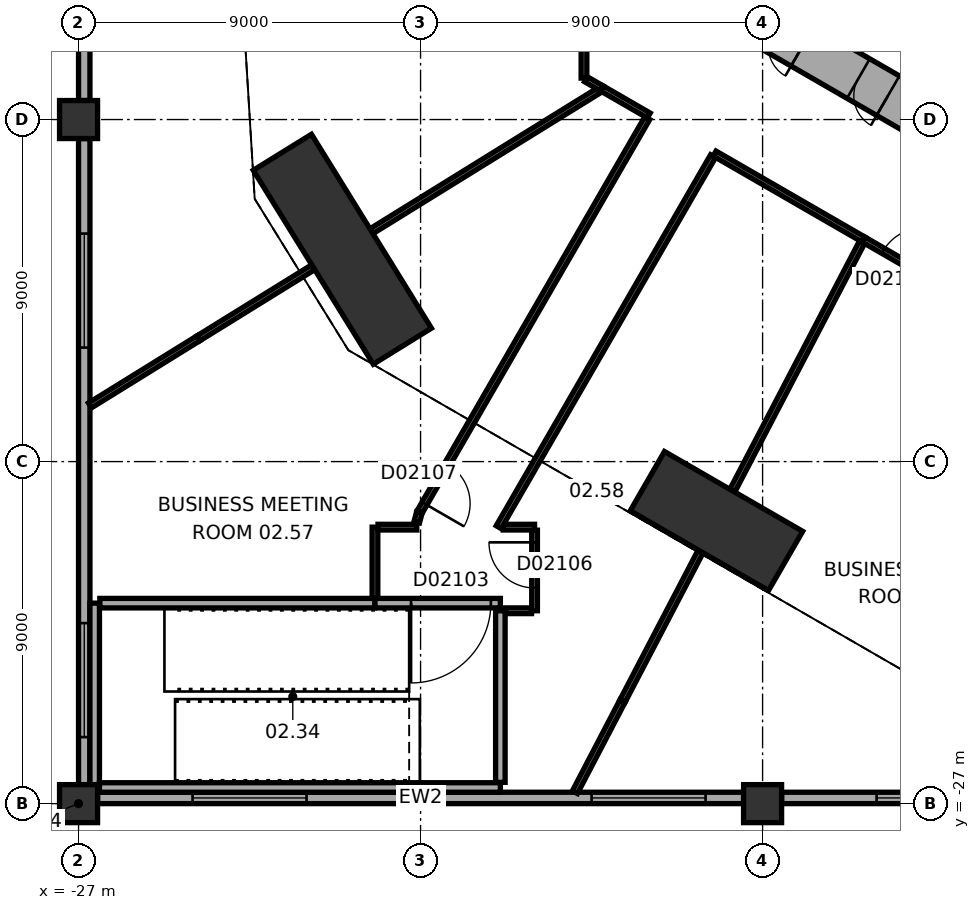
"""IFC4 building model, lengths in metres.
Left out: names, types, materials, properties, quantities, classifications, styles, units other than length and angle.
Written with IfcOpenShell. Run it as: python <this file> out.ifc"""

import sys

from ifc_helpers import new_model, si_unit, direction, frame, frame_2d, origin, origin_2d, place, context, subcontext, project, spatial, rectangle, extrude, element, fill, save


model = new_model("IFC4")
c1 = context("Model", 3, precision=1e-05, world=origin(), true_north=direction((0.0, 1.0)))
c2 = subcontext(c1, "Body", "Model", "MODEL_VIEW")
j1 = project(units=[si_unit("LENGTHUNIT", "METRE"), si_unit("PLANEANGLEUNIT", "RADIAN")], contexts=[c1])
p1 = place(None, origin())
s1 = spatial("IfcSite", under=j1, at=p1, CompositionType="ELEMENT")
p2 = place(p1, origin())
s2 = spatial("IfcBuilding", under=s1, at=p2, CompositionType="ELEMENT")
p3 = place(p2, frame((0.0, 0.0, 13.0)))
s3 = spatial("IfcBuildingStorey", under=s2, at=p3, CompositionType="ELEMENT", Elevation=13.0)
p4 = place(p3, frame((-20.058, -12.413, 0.0), z_axis=(0.0, 0.0, 1.0), x_axis=(0.526202050444, -0.850359572245, 0.0)))
e1 = element("IfcColumn", 1, at=p4, inside=s3, PredefinedType="COLUMN", context=c2, shape_type="SweptSolid", body=[
    extrude(rectangle(XDim=6.0, YDim=1.8, at=origin_2d()), origin(), (0.0, 0.0, 1.0), 8.0),
])
p5 = place(p3, frame((-10.213, -19.564, 0.0), z_axis=(0.0, 0.0, 1.0), x_axis=(0.866028021766, -0.499995465495, 0.0)))
e2 = element("IfcColumn", 2, at=p5, inside=s3, PredefinedType="COLUMN", context=c2, shape_type="SweptSolid", body=[
    extrude(rectangle(XDim=4.2, YDim=1.8, at=origin_2d()), origin(), (0.0, 0.0, 1.0), 8.0),
])
for number, where, z_axis, x_axis in (
    (3, (-27.0, -27.0, 0.0), (0.0, 0.0, 1.0), (1.0, 0.0, 0.0)),
    (4, (-27.0, -9.0, 0.0), (0.0, 0.0, 1.0), (1.0, 0.0, 0.0)),
    (5, (-9.0, -27.0, 0.0), (0.0, 0.0, 1.0), (1.0, 0.0, 0.0)),
):
    element("IfcColumn", number, at=place(p3, frame(where, z_axis=z_axis, x_axis=x_axis)), inside=s3, PredefinedType="COLUMN", context=c2, shape_type="SweptSolid", body=[
        extrude(rectangle(XDim=1.0, YDim=1.0, at=origin_2d()), origin(), (0.0, 0.0, 1.0), 8.0),
    ])
p6 = place(p3, frame((-10.4, -5.658, 0.0), z_axis=(0.0, 0.0, 1.0), x_axis=(0.866021384402, -0.500006961711, 0.0)))
e6 = element("IfcWall", 6, at=p6, inside=s3, PredefinedType="SHEAR", context=c2, shape_type="SweptSolid", body=[
    extrude(rectangle(XDim=12.355, YDim=1.2, at=frame_2d((6.178, 0.0))), origin(), (0.0, 0.0, 1.0), 8.0),
])
p7 = place(p6, frame((6.378, 0.0, 0.0)))
e7 = element("IfcOpeningElement", 7, at=p7, cuts=e6, PredefinedType="OPENING", context=c2, shape_type="SweptSolid", body=[
    extrude(rectangle(XDim=1.5, YDim=2.1, at=frame_2d((0.75, 1.05))), frame((0.0, 0.61, 0.0), z_axis=(0.0, -1.0, 0.0), x_axis=(1.0, 0.0, 0.0)), (0.0, 0.0, 1.0), 1.22),
])
p8 = place(p6, frame((1.928, 0.0, 0.0)))
e8 = element("IfcOpeningElement", 8, at=p8, cuts=e6, PredefinedType="OPENING", context=c2, shape_type="SweptSolid", body=[
    extrude(rectangle(XDim=0.9, YDim=2.1, at=frame_2d((0.45, 1.05))), frame((0.0, 0.61, 0.0), z_axis=(0.0, -1.0, 0.0), x_axis=(1.0, 0.0, 0.0)), (0.0, 0.0, 1.0), 1.22),
])
p9 = place(p6, frame((4.528, 0.0, 0.0)))
e9 = element("IfcOpeningElement", 9, at=p9, cuts=e6, PredefinedType="OPENING", context=c2, shape_type="SweptSolid", body=[
    extrude(rectangle(XDim=0.9, YDim=2.1, at=frame_2d((0.45, 1.05))), frame((0.0, 0.61, 0.0), z_axis=(0.0, -1.0, 0.0), x_axis=(1.0, 0.0, 0.0)), (0.0, 0.0, 1.0), 1.22),
])
p10 = place(p3, frame((-26.5, -26.85, 0.0), z_axis=(0.0, 0.0, 1.0), x_axis=(1.0, 0.0, 0.0)))
e10 = element("IfcWall", 10, at=p10, inside=s3, PredefinedType="STANDARD", context=c2, shape_type="SweptSolid", body=[
    extrude(rectangle(XDim=17.0, YDim=0.3, at=frame_2d((8.5, 0.0))), origin(), (0.0, 0.0, 1.0), 6.5),
])
p11 = place(p10, frame((2.5, 0.0, 1.0)))
e11 = element("IfcOpeningElement", 11, at=p11, cuts=e10, PredefinedType="OPENING", context=c2, shape_type="SweptSolid", body=[
    extrude(rectangle(XDim=3.0, YDim=4.0, at=frame_2d((1.5, 2.0))), frame((0.0, 0.16, 0.0), z_axis=(0.0, -1.0, 0.0), x_axis=(1.0, 0.0, 0.0)), (0.0, 0.0, 1.0), 0.32),
])
p12 = place(p10, frame((13.0, 0.0, 1.0)))
e12 = element("IfcOpeningElement", 12, at=p12, cuts=e10, PredefinedType="OPENING", context=c2, shape_type="SweptSolid", body=[
    extrude(rectangle(XDim=3.0, YDim=4.0, at=frame_2d((1.5, 2.0))), frame((0.0, 0.16, 0.0), z_axis=(0.0, -1.0, 0.0), x_axis=(1.0, 0.0, 0.0)), (0.0, 0.0, 1.0), 0.32),
])
p13 = place(p3, frame((-8.5, -26.85, 0.0), z_axis=(0.0, 0.0, 1.0), x_axis=(1.0, 0.0, 0.0)))
e13 = element("IfcWall", 13, at=p13, inside=s3, PredefinedType="STANDARD", context=c2, shape_type="SweptSolid", body=[
    extrude(rectangle(XDim=17.0, YDim=0.3, at=frame_2d((8.5, 0.0))), origin(), (0.0, 0.0, 1.0), 6.5),
])
p14 = place(p13, frame((2.5, 0.0, 1.0)))
e14 = element("IfcOpeningElement", 14, at=p14, cuts=e13, PredefinedType="OPENING", context=c2, shape_type="SweptSolid", body=[
    extrude(rectangle(XDim=3.0, YDim=4.0, at=frame_2d((1.5, 2.0))), frame((0.0, 0.16, 0.0), z_axis=(0.0, -1.0, 0.0), x_axis=(1.0, 0.0, 0.0)), (0.0, 0.0, 1.0), 0.32),
])
p15 = place(p13, frame((11.5, 0.0, 1.0)))
e15 = element("IfcOpeningElement", 15, at=p15, cuts=e13, PredefinedType="OPENING", context=c2, shape_type="SweptSolid", body=[
    extrude(rectangle(XDim=3.0, YDim=4.0, at=frame_2d((1.5, 2.0))), frame((0.0, 0.16, 0.0), z_axis=(0.0, -1.0, 0.0), x_axis=(1.0, 0.0, 0.0)), (0.0, 0.0, 1.0), 0.32),
])
p16 = place(p3, frame((-26.85, 8.5, 0.0), z_axis=(0.0, 0.0, 1.0), x_axis=(0.0, -1.0, 0.0)))
e16 = element("IfcWall", 16, at=p16, inside=s3, PredefinedType="STANDARD", context=c2, shape_type="SweptSolid", body=[
    extrude(rectangle(XDim=17.0, YDim=0.3, at=frame_2d((8.5, 0.0))), origin(), (0.0, 0.0, 1.0), 6.5),
])
p17 = place(p16, frame((2.5, 0.0, 1.0)))
e17 = element("IfcOpeningElement", 17, at=p17, cuts=e16, PredefinedType="OPENING", context=c2, shape_type="SweptSolid", body=[
    extrude(rectangle(XDim=3.0, YDim=4.0, at=frame_2d((1.5, 2.0))), frame((0.0, 0.16, 0.0), z_axis=(0.0, -1.0, 0.0), x_axis=(1.0, 0.0, 0.0)), (0.0, 0.0, 1.0), 0.32),
])
p18 = place(p16, frame((11.5, 0.0, 1.0)))
e18 = element("IfcOpeningElement", 18, at=p18, cuts=e16, PredefinedType="OPENING", context=c2, shape_type="SweptSolid", body=[
    extrude(rectangle(XDim=3.0, YDim=4.0, at=frame_2d((1.5, 2.0))), frame((0.0, 0.16, 0.0), z_axis=(0.0, -1.0, 0.0), x_axis=(1.0, 0.0, 0.0)), (0.0, 0.0, 1.0), 0.32),
])
p19 = place(p3, frame((-26.85, -9.5, 0.0), z_axis=(0.0, 0.0, 1.0), x_axis=(0.0, -1.0, 0.0)))
e19 = element("IfcWall", 19, at=p19, inside=s3, PredefinedType="STANDARD", context=c2, shape_type="SweptSolid", body=[
    extrude(rectangle(XDim=17.0, YDim=0.3, at=frame_2d((8.5, 0.0))), origin(), (0.0, 0.0, 1.0), 6.5),
])
p20 = place(p19, frame((2.5, 0.0, 1.0)))
e20 = element("IfcOpeningElement", 20, at=p20, cuts=e19, PredefinedType="OPENING", context=c2, shape_type="SweptSolid", body=[
    extrude(rectangle(XDim=3.0, YDim=4.0, at=frame_2d((1.5, 2.0))), frame((0.0, 0.16, 0.0), z_axis=(0.0, -1.0, 0.0), x_axis=(1.0, 0.0, 0.0)), (0.0, 0.0, 1.0), 0.32),
])
p21 = place(p19, frame((12.75, 0.0, 1.0)))
e21 = element("IfcOpeningElement", 21, at=p21, cuts=e19, PredefinedType="OPENING", context=c2, shape_type="SweptSolid", body=[
    extrude(rectangle(XDim=3.0, YDim=4.0, at=frame_2d((1.5, 2.0))), frame((0.0, 0.16, 0.0), z_axis=(0.0, -1.0, 0.0), x_axis=(1.0, 0.0, 0.0)), (0.0, 0.0, 1.0), 0.32),
])
p22 = place(p3, frame((-12.686, -24.3, 0.0), z_axis=(0.0, 0.0, 1.0), x_axis=(-0.462800215564, -0.886462610872, 0.0)))
e22 = element("IfcWall", 22, at=p22, inside=s3, PredefinedType="PARTITIONING", context=c2, shape_type="SweptSolid", body=[
    extrude(rectangle(XDim=2.707, YDim=0.15, at=frame_2d((1.354, 0.0))), origin(), (0.0, 0.0, 1.0), 7.7),
])
p23 = place(p3, frame((-12.686, -24.3, 0.0), z_axis=(0.0, 0.0, 1.0), x_axis=(0.462800821993, 0.88646229427, 0.0)))
e23 = element("IfcWall", 23, at=p23, inside=s3, PredefinedType="PARTITIONING", context=c2, shape_type="SweptSolid", body=[
    extrude(rectangle(XDim=4.441, YDim=0.15, at=frame_2d((2.221, 0.0))), origin(), (0.0, 0.0, 1.0), 7.7),
])
p24 = place(p3, frame((-15.9, -21.925, 0.0), z_axis=(0.0, 0.0, 1.0), x_axis=(0.0, -1.0, 0.0)))
e24 = element("IfcWall", 24, at=p24, inside=s3, PredefinedType="SOLIDWALL", context=c2, shape_type="SweptSolid", body=[
    extrude(rectangle(XDim=4.515, YDim=0.25, at=frame_2d((2.257, 0.0))), origin(), (0.0, 0.0, 1.0), 7.7),
])
p25 = place(p3, frame((-15.08, -21.925, 0.0), z_axis=(0.0, 0.0, 1.0), x_axis=(-1.0, 0.0, 0.0)))
e25 = element("IfcWall", 25, at=p25, inside=s3, PredefinedType="PARTITIONING", context=c2, shape_type="SweptSolid", body=[
    extrude(rectangle(XDim=0.68, YDim=0.15, at=frame_2d((0.34, 0.0))), origin(), (0.0, 0.0, 1.0), 7.7),
])
p26 = place(p3, frame((-26.44, -21.725, 0.0), z_axis=(0.0, 0.0, 1.0), x_axis=(1.0, 0.0, 0.0)))
e26 = element("IfcWall", 26, at=p26, inside=s3, PredefinedType="SOLIDWALL", context=c2, shape_type="SweptSolid", body=[
    extrude(rectangle(XDim=7.24, YDim=0.25, at=frame_2d((3.62, 0.0))), origin(), (0.0, 0.0, 1.0), 7.7),
])
p27 = place(p3, frame((-19.2, -21.725, 0.0), z_axis=(0.0, 0.0, 1.0), x_axis=(1.0, 0.0, 0.0)))
e27 = element("IfcWall", 27, at=p27, inside=s3, PredefinedType="SOLIDWALL", context=c2, shape_type="SweptSolid", body=[
    extrude(rectangle(XDim=3.3, YDim=0.25, at=frame_2d((1.65, 0.0))), origin(), (0.0, 0.0, 1.0), 7.7),
])
p28 = place(p27, frame((0.95, 0.0, 0.0)))
e28 = element("IfcOpeningElement", 28, at=p28, cuts=e27, PredefinedType="OPENING", context=c2, shape_type="SweptSolid", body=[
    extrude(rectangle(XDim=2.1, YDim=2.4, at=frame_2d((1.05, 1.2))), frame((0.0, 0.135, 0.0), z_axis=(0.0, -1.0, 0.0), x_axis=(1.0, 0.0, 0.0)), (0.0, 0.0, 1.0), 0.27),
])
p29 = place(p3, frame((-19.2, -21.585, 0.0), z_axis=(0.0, 0.0, 1.0), x_axis=(0.0, 1.0, 0.0)))
e29 = element("IfcWall", 29, at=p29, inside=s3, PredefinedType="PARTITIONING", context=c2, shape_type="SweptSolid", body=[
    extrude(rectangle(XDim=1.86, YDim=0.15, at=frame_2d((0.93, 0.0))), origin(), (0.0, 0.0, 1.0), 7.7),
])
p30 = place(p3, frame((-15.0, -19.805, 0.0), z_axis=(0.0, 0.0, 1.0), x_axis=(0.0, -1.0, 0.0)))
e30 = element("IfcWall", 30, at=p30, inside=s3, PredefinedType="PARTITIONING", context=c2, shape_type="SweptSolid", body=[
    extrude(rectangle(XDim=2.12, YDim=0.15, at=frame_2d((1.06, 0.0))), origin(), (0.0, 0.0, 1.0), 7.7),
])
p31 = place(p30, frame((0.32, 0.0, 0.0)))
e31 = element("IfcOpeningElement", 31, at=p31, cuts=e30, PredefinedType="OPENING", context=c2, shape_type="SweptSolid", body=[
    extrude(rectangle(XDim=1.2, YDim=2.1, at=frame_2d((0.6, 1.05))), frame((0.0, 0.085, 0.0), z_axis=(0.0, -1.0, 0.0), x_axis=(1.0, 0.0, 0.0)), (0.0, 0.0, 1.0), 0.17),
])
p32 = place(p3, frame((-19.12, -19.725, 0.0), z_axis=(0.0, 0.0, 1.0), x_axis=(1.0, 0.0, 0.0)))
e32 = element("IfcWall", 32, at=p32, inside=s3, PredefinedType="PARTITIONING", context=c2, shape_type="SweptSolid", body=[
    extrude(rectangle(XDim=1.02, YDim=0.15, at=frame_2d((0.51, 0.0))), origin(), (0.0, 0.0, 1.0), 7.7),
])
p33 = place(p3, frame((-15.825, -19.725, 0.0), z_axis=(0.0, 0.0, 1.0), x_axis=(1.0, 0.0, 0.0)))
e33 = element("IfcWall", 33, at=p33, inside=s3, PredefinedType="PARTITIONING", context=c2, shape_type="SweptSolid", body=[
    extrude(rectangle(XDim=0.825, YDim=0.15, at=frame_2d((0.413, 0.0))), origin(), (0.0, 0.0, 1.0), 7.7),
])
p34 = place(p3, frame((-18.1, -19.593, 0.0), z_axis=(0.0, 0.0, 1.0), x_axis=(0.260139468531, 0.965571052234, 0.0)))
e34 = element("IfcWall", 34, at=p34, inside=s3, PredefinedType="PARTITIONING", context=c2, shape_type="SweptSolid", body=[
    extrude(rectangle(XDim=0.264, YDim=0.15, at=frame_2d((0.132, 0.0))), origin(), (0.0, 0.0, 1.0), 7.7),
])
p35 = place(p3, frame((-18.021, -19.321, 0.0), z_axis=(0.0, 0.0, 1.0), x_axis=(0.500403049961, 0.865792577694, 0.0)))
e35 = element("IfcWall", 35, at=p35, inside=s3, PredefinedType="PARTITIONING", context=c2, shape_type="SweptSolid", body=[
    extrude(rectangle(XDim=11.963, YDim=0.15, at=frame_2d((5.982, 0.0))), origin(), (0.0, 0.0, 1.0), 7.7),
])
p36 = place(p35, frame((0.25, 0.0, 0.0)))
e36 = element("IfcOpeningElement", 36, at=p36, cuts=e35, PredefinedType="OPENING", context=c2, shape_type="SweptSolid", body=[
    extrude(rectangle(XDim=1.2, YDim=2.1, at=frame_2d((0.6, 1.05))), frame((0.0, 0.085, 0.0), z_axis=(0.0, -1.0, 0.0), x_axis=(1.0, 0.0, 0.0)), (0.0, 0.0, 1.0), 0.17),
])
p37 = place(p3, frame((-9.796, -18.766, 0.0), z_axis=(0.0, 0.0, 1.0), x_axis=(0.462793341808, 0.886466199456, 0.0)))
e37 = element("IfcWall", 37, at=p37, inside=s3, PredefinedType="PARTITIONING", context=c2, shape_type="SweptSolid", body=[
    extrude(rectangle(XDim=7.376, YDim=0.15, at=frame_2d((3.688, 0.0))), origin(), (0.0, 0.0, 1.0), 7.7),
])
p38 = place(p3, frame((0.0, -15.82, 0.0), z_axis=(0.0, 0.0, 1.0), x_axis=(-0.866018019704, 0.500012789385, 0.0)))
e38 = element("IfcWall", 38, at=p38, inside=s3, PredefinedType="PARTITIONING", context=c2, shape_type="SweptSolid", body=[
    extrude(rectangle(XDim=7.327, YDim=0.15, at=frame_2d((3.664, 0.0))), origin(), (0.0, 0.0, 1.0), 7.7),
])
p39 = place(p38, frame((5.527, 0.0, 0.0)))
e39 = element("IfcOpeningElement", 39, at=p39, cuts=e38, PredefinedType="OPENING", context=c2, shape_type="SweptSolid", body=[
    extrude(rectangle(XDim=1.2, YDim=2.1, at=frame_2d((0.6, 1.05))), frame((0.0, 0.085, 0.0), z_axis=(0.0, -1.0, 0.0), x_axis=(1.0, 0.0, 0.0)), (0.0, 0.0, 1.0), 0.17),
])
p40 = place(p3, frame((-23.843, -14.754, 0.0), z_axis=(0.0, 0.0, 1.0), x_axis=(-0.850333278488, -0.526244539635, 0.0)))
e40 = element("IfcWall", 40, at=p40, inside=s3, PredefinedType="PARTITIONING", context=c2, shape_type="SweptSolid", body=[
    extrude(rectangle(XDim=3.36, YDim=0.15, at=frame_2d((1.68, 0.0))), origin(), (0.0, 0.0, 1.0), 7.7),
])
p41 = place(p3, frame((-23.843, -14.754, 0.0), z_axis=(0.0, 0.0, 1.0), x_axis=(0.850369165181, 0.526186547633, 0.0)))
e41 = element("IfcWall", 41, at=p41, inside=s3, PredefinedType="PARTITIONING", context=c2, shape_type="SweptSolid", body=[
    extrude(rectangle(XDim=3.551, YDim=0.15, at=frame_2d((1.775, 0.0))), origin(), (0.0, 0.0, 1.0), 7.7),
])
p42 = place(p3, frame((-6.346, -12.156, 0.0), z_axis=(0.0, 0.0, 1.0), x_axis=(-0.866015706063, 0.50001679657, 0.0)))
e42 = element("IfcWall", 42, at=p42, inside=s3, PredefinedType="PARTITIONING", context=c2, shape_type="SweptSolid", body=[
    extrude(rectangle(XDim=4.523, YDim=0.15, at=frame_2d((2.262, 0.0))), origin(), (0.0, 0.0, 1.0), 7.7),
])
p43 = place(p3, frame((-19.293, -11.939, 0.0), z_axis=(0.0, 0.0, 1.0), x_axis=(0.85034374829, 0.526227621609, 0.0)))
e43 = element("IfcWall", 43, at=p43, inside=s3, PredefinedType="PARTITIONING", context=c2, shape_type="SweptSolid", body=[
    extrude(rectangle(XDim=7.016, YDim=0.15, at=frame_2d((3.508, 0.0))), origin(), (0.0, 0.0, 1.0), 7.7),
])
p44 = place(p3, frame((-10.303, -9.963, 0.0), z_axis=(0.0, 0.0, 1.0), x_axis=(-0.500409628778, -0.865788775295, 0.0)))
e44 = element("IfcWall", 44, at=p44, inside=s3, PredefinedType="PARTITIONING", context=c2, shape_type="SweptSolid", body=[
    extrude(rectangle(XDim=11.275, YDim=0.15, at=frame_2d((5.637, 0.0))), origin(), (0.0, 0.0, 1.0), 7.7),
])
p45 = place(p3, frame((-11.995, -8.894, 0.0), z_axis=(0.0, 0.0, 1.0), x_axis=(-0.866076810767, 0.499910949922, 0.0)))
e45 = element("IfcWall", 45, at=p45, inside=s3, PredefinedType="PARTITIONING", context=c2, shape_type="SweptSolid", body=[
    extrude(rectangle(XDim=1.42, YDim=0.15, at=frame_2d((0.71, 0.0))), origin(), (0.0, 0.0, 1.0), 7.7),
])
p46 = place(p3, frame((-13.648, -7.939, 0.0), z_axis=(0.0, 0.0, 1.0), x_axis=(0.865585916185, -0.500760443428, 0.0)))
e46 = element("IfcWall", 46, at=p46, inside=s3, PredefinedType="PARTITIONING", context=c2, shape_type="SweptSolid", body=[
    extrude(rectangle(XDim=0.489, YDim=0.15, at=frame_2d((0.244, 0.0))), origin(), (0.0, 0.0, 1.0), 7.7),
])
p47 = place(p3, frame((-13.7, -7.909, 0.0), z_axis=(0.0, 0.0, 1.0), x_axis=(0.0, 1.0, 0.0)))
e47 = element("IfcWall", 47, at=p47, inside=s3, PredefinedType="PARTITIONING", context=c2, shape_type="SweptSolid", body=[
    extrude(rectangle(XDim=7.655, YDim=0.15, at=frame_2d((3.827, 0.0))), origin(), (0.0, 0.0, 1.0), 7.7),
])
p48 = place(p47, frame((5.854, 0.0, 0.0)))
e48 = element("IfcOpeningElement", 48, at=p48, cuts=e47, PredefinedType="OPENING", context=c2, shape_type="SweptSolid", body=[
    extrude(rectangle(XDim=1.2, YDim=2.1, at=frame_2d((0.6, 1.05))), frame((0.0, 0.085, 0.0), z_axis=(0.0, -1.0, 0.0), x_axis=(1.0, 0.0, 0.0)), (0.0, 0.0, 1.0), 0.17),
])
p49 = place(p3, frame((-26.575, -21.725, 0.0), z_axis=(0.0, 0.0, 1.0), x_axis=(0.0, -1.0, 0.0)))
e49 = element("IfcWall", 49, at=p49, inside=s3, PredefinedType="SOLIDWALL", context=c2, shape_type="SweptSolid", body=[
    extrude(rectangle(XDim=4.975, YDim=0.25, at=frame_2d((2.487, 0.0))), origin(), (0.0, 0.0, 1.0), 7.7),
])
p50 = place(p3, frame((-26.45, -26.575, 0.0), z_axis=(0.0, 0.0, 1.0), x_axis=(1.0, 0.0, 0.0)))
e50 = element("IfcWall", 50, at=p50, inside=s3, PredefinedType="SOLIDWALL", context=c2, shape_type="SweptSolid", body=[
    extrude(rectangle(XDim=10.55, YDim=0.25, at=frame_2d((5.275, 0.0))), origin(), (0.0, 0.0, 1.0), 7.7),
])
p51 = place(p11, origin())
e51 = element("IfcWindow", 51, at=p51, inside=s3, PartitioningType="SINGLE_PANEL", PredefinedType="WINDOW", context=c2, shape_type="SweptSolid", body=[
    extrude(rectangle(XDim=3.0, YDim=4.0, at=frame_2d((1.5, 2.0))), frame((0.0, 0.03, 0.0), z_axis=(0.0, -1.0, 0.0), x_axis=(1.0, 0.0, 0.0)), (0.0, 0.0, 1.0), 0.06),
])
fill(e11, e51)
p52 = place(p12, origin())
e52 = element("IfcWindow", 52, at=p52, inside=s3, PartitioningType="SINGLE_PANEL", PredefinedType="WINDOW", context=c2, shape_type="SweptSolid", body=[
    extrude(rectangle(XDim=3.0, YDim=4.0, at=frame_2d((1.5, 2.0))), frame((0.0, 0.03, 0.0), z_axis=(0.0, -1.0, 0.0), x_axis=(1.0, 0.0, 0.0)), (0.0, 0.0, 1.0), 0.06),
])
fill(e12, e52)
p53 = place(p14, origin())
e53 = element("IfcWindow", 53, at=p53, inside=s3, PartitioningType="SINGLE_PANEL", PredefinedType="WINDOW", context=c2, shape_type="SweptSolid", body=[
    extrude(rectangle(XDim=3.0, YDim=4.0, at=frame_2d((1.5, 2.0))), frame((0.0, 0.03, 0.0), z_axis=(0.0, -1.0, 0.0), x_axis=(1.0, 0.0, 0.0)), (0.0, 0.0, 1.0), 0.06),
])
fill(e14, e53)
p54 = place(p20, origin())
e54 = element("IfcWindow", 54, at=p54, inside=s3, PartitioningType="SINGLE_PANEL", PredefinedType="WINDOW", context=c2, shape_type="SweptSolid", body=[
    extrude(rectangle(XDim=3.0, YDim=4.0, at=frame_2d((1.5, 2.0))), frame((0.0, 0.03, 0.0), z_axis=(0.0, -1.0, 0.0), x_axis=(1.0, 0.0, 0.0)), (0.0, 0.0, 1.0), 0.06),
])
fill(e20, e54)
p55 = place(p21, origin())
e55 = element("IfcWindow", 55, at=p55, inside=s3, PartitioningType="SINGLE_PANEL", PredefinedType="WINDOW", context=c2, shape_type="SweptSolid", body=[
    extrude(rectangle(XDim=3.0, YDim=4.0, at=frame_2d((1.5, 2.0))), frame((0.0, 0.03, 0.0), z_axis=(0.0, -1.0, 0.0), x_axis=(1.0, 0.0, 0.0)), (0.0, 0.0, 1.0), 0.06),
])
fill(e21, e55)
p56 = place(p9, origin())
e56 = element("IfcDoor", 56, at=p56, inside=s3, OperationType="SINGLE_SWING_LEFT", PredefinedType="DOOR", context=c2, shape_type="SweptSolid", body=[
    extrude(rectangle(XDim=0.9, YDim=2.1, at=frame_2d((0.45, 1.05))), frame((0.0, 0.025, 0.0), z_axis=(0.0, -1.0, 0.0), x_axis=(1.0, 0.0, 0.0)), (0.0, 0.0, 1.0), 0.05),
])
fill(e9, e56)
p57 = place(p28, frame((2.1, 0.0, 0.0), z_axis=(0.0, 0.0, 1.0), x_axis=(-1.0, 0.0, 0.0)))
e57 = element("IfcDoor", 57, at=p57, inside=s3, OperationType="DOUBLE_DOOR_SINGLE_SWING", PredefinedType="DOOR", context=c2, shape_type="SweptSolid", body=[
    extrude(rectangle(XDim=2.1, YDim=2.4, at=frame_2d((1.05, 1.2))), frame((0.0, 0.025, 0.0), z_axis=(0.0, -1.0, 0.0), x_axis=(1.0, 0.0, 0.0)), (0.0, 0.0, 1.0), 0.05),
])
fill(e28, e57)
p58 = place(p31, origin())
e58 = element("IfcDoor", 58, at=p58, inside=s3, OperationType="SINGLE_SWING_LEFT", PredefinedType="DOOR", context=c2, shape_type="SweptSolid", body=[
    extrude(rectangle(XDim=1.2, YDim=2.1, at=frame_2d((0.6, 1.05))), frame((0.0, 0.025, 0.0), z_axis=(0.0, -1.0, 0.0), x_axis=(1.0, 0.0, 0.0)), (0.0, 0.0, 1.0), 0.05),
])
fill(e31, e58)
p59 = place(p36, origin())
e59 = element("IfcDoor", 59, at=p59, inside=s3, OperationType="SINGLE_SWING_LEFT", PredefinedType="DOOR", context=c2, shape_type="SweptSolid", body=[
    extrude(rectangle(XDim=1.2, YDim=2.1, at=frame_2d((0.6, 1.05))), frame((0.0, 0.025, 0.0), z_axis=(0.0, -1.0, 0.0), x_axis=(1.0, 0.0, 0.0)), (0.0, 0.0, 1.0), 0.05),
])
fill(e36, e59)
p60 = place(p39, origin())
e60 = element("IfcDoor", 60, at=p60, inside=s3, OperationType="SINGLE_SWING_LEFT", PredefinedType="DOOR", context=c2, shape_type="SweptSolid", body=[
    extrude(rectangle(XDim=1.2, YDim=2.1, at=frame_2d((0.6, 1.05))), frame((0.0, 0.025, 0.0), z_axis=(0.0, -1.0, 0.0), x_axis=(1.0, 0.0, 0.0)), (0.0, 0.0, 1.0), 0.05),
])
fill(e39, e60)
save(model, sys.argv[1])
